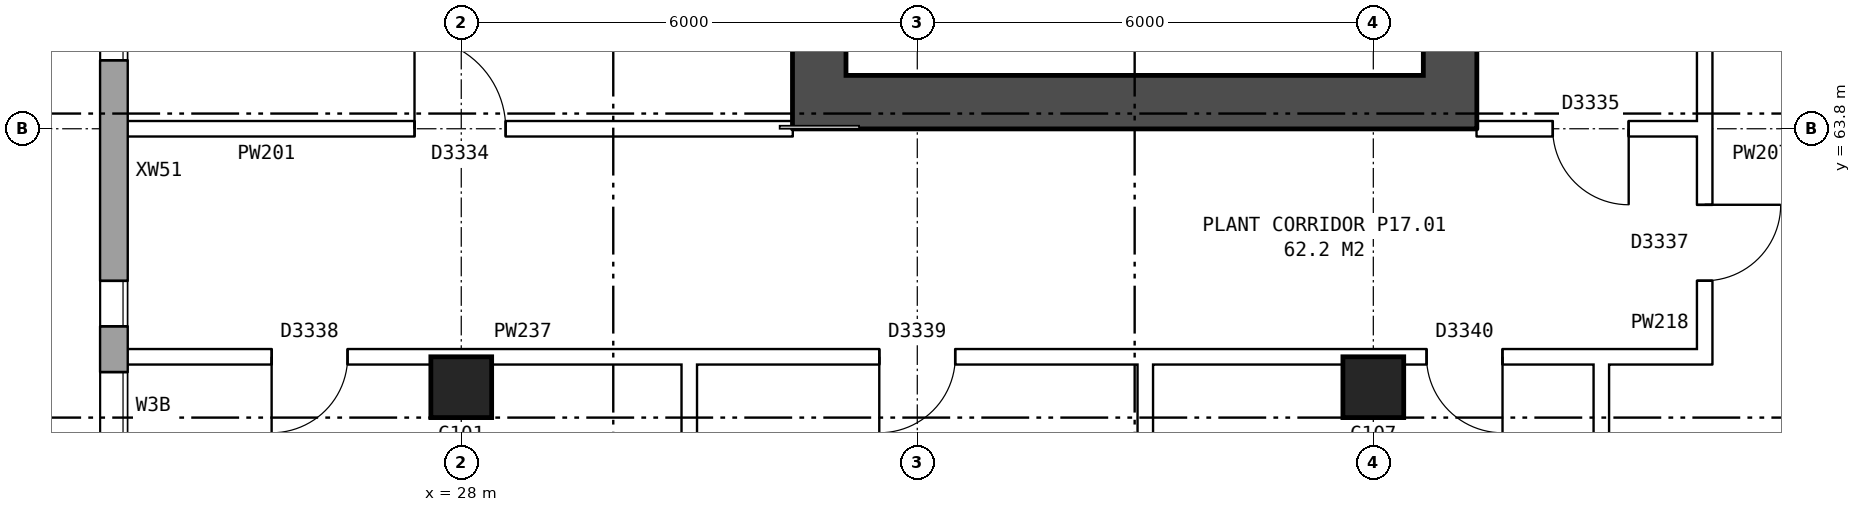
"""IFC4 building model, lengths in metres.
Left out: names, types, materials, properties, quantities, classifications, styles, units other than length and angle.
Written with IfcOpenShell. Run it as: python <this file> out.ifc"""

import sys

from ifc_helpers import new_model, si_unit, direction, frame, frame_2d, origin, origin_2d, place, context, subcontext, project, spatial, rectangle, extrude, element, fill, save


model = new_model("IFC4")
c1 = context("Model", 3, precision=1e-05, world=origin(), true_north=direction((0.0, 1.0)))
c2 = subcontext(c1, "Body", "Model", "MODEL_VIEW")
j1 = project(units=[si_unit("LENGTHUNIT", "METRE"), si_unit("PLANEANGLEUNIT", "RADIAN")], contexts=[c1])
p1 = place(None, origin())
s1 = spatial("IfcSite", under=j1, at=p1, CompositionType="ELEMENT")
p2 = place(p1, origin())
s2 = spatial("IfcBuilding", under=s1, at=p2, CompositionType="ELEMENT")
p3 = place(p2, frame((0.0, 0.0, 62.9)))
s3 = spatial("IfcBuildingStorey", under=s2, at=p3, CompositionType="ELEMENT", Elevation=62.9)
for number, where, z_axis, x_axis in (
    (1, (28.0, 60.4, 0.0), (0.0, 0.0, 1.0), (1.0, 0.0, 0.0)),
    (2, (40.0, 60.4, 0.0), (0.0, 0.0, 1.0), (1.0, 0.0, 0.0)),
):
    element("IfcColumn", number, at=place(p3, frame(where, z_axis=z_axis, x_axis=x_axis)), inside=s3, PredefinedType="COLUMN", context=c2, shape_type="SweptSolid", body=[
        extrude(rectangle(XDim=0.8, YDim=0.8, at=origin_2d()), origin(), (0.0, 0.0, 1.0), 4.2),
    ])
p4 = place(p3, frame((23.43, 82.925, 0.0), z_axis=(0.0, 0.0, 1.0), x_axis=(0.0, -1.0, 0.0)))
e3 = element("IfcWall", 3, at=p4, inside=s3, PredefinedType="STANDARD", context=c2, shape_type="SweptSolid", body=[
    extrude(rectangle(XDim=25.851, YDim=0.36, at=frame_2d((12.925, 0.0))), origin(), (0.0, 0.0, 1.0), 4.2),
])
p5 = place(p4, frame((1.625, 0.0, 1.5)))
e4 = element("IfcOpeningElement", 4, at=p5, cuts=e3, PredefinedType="OPENING", context=c2, shape_type="SweptSolid", body=[
    extrude(rectangle(XDim=1.6, YDim=1.2, at=frame_2d((0.8, 0.6))), frame((0.0, 0.19, 0.0), z_axis=(0.0, -1.0, 0.0), x_axis=(1.0, 0.0, 0.0)), (0.0, 0.0, 1.0), 0.38),
])
p6 = place(p4, frame((4.625, 0.0, 1.5)))
e5 = element("IfcOpeningElement", 5, at=p6, cuts=e3, PredefinedType="OPENING", context=c2, shape_type="SweptSolid", body=[
    extrude(rectangle(XDim=1.6, YDim=1.2, at=frame_2d((0.8, 0.6))), frame((0.0, 0.19, 0.0), z_axis=(0.0, -1.0, 0.0), x_axis=(1.0, 0.0, 0.0)), (0.0, 0.0, 1.0), 0.38),
])
p7 = place(p4, frame((8.775, 0.0, 1.5)))
e6 = element("IfcOpeningElement", 6, at=p7, cuts=e3, PredefinedType="OPENING", context=c2, shape_type="SweptSolid", body=[
    extrude(rectangle(XDim=0.6, YDim=1.2, at=frame_2d((0.3, 0.6))), frame((0.0, 0.19, 0.0), z_axis=(0.0, -1.0, 0.0), x_axis=(1.0, 0.0, 0.0)), (0.0, 0.0, 1.0), 0.38),
])
p8 = place(p4, frame((9.675, 0.0, 1.5)))
e7 = element("IfcOpeningElement", 7, at=p8, cuts=e3, PredefinedType="OPENING", context=c2, shape_type="SweptSolid", body=[
    extrude(rectangle(XDim=1.2, YDim=1.2, at=frame_2d((0.6, 0.6))), frame((0.0, 0.19, 0.0), z_axis=(0.0, -1.0, 0.0), x_axis=(1.0, 0.0, 0.0)), (0.0, 0.0, 1.0), 0.38),
])
p9 = place(p4, frame((13.625, 0.0, 1.5)))
e8 = element("IfcOpeningElement", 8, at=p9, cuts=e3, PredefinedType="OPENING", context=c2, shape_type="SweptSolid", body=[
    extrude(rectangle(XDim=1.6, YDim=1.2, at=frame_2d((0.8, 0.6))), frame((0.0, 0.19, 0.0), z_axis=(0.0, -1.0, 0.0), x_axis=(1.0, 0.0, 0.0)), (0.0, 0.0, 1.0), 0.38),
])
p10 = place(p4, frame((16.625, 0.0, 1.5)))
e9 = element("IfcOpeningElement", 9, at=p10, cuts=e3, PredefinedType="OPENING", context=c2, shape_type="SweptSolid", body=[
    extrude(rectangle(XDim=1.6, YDim=1.2, at=frame_2d((0.8, 0.6))), frame((0.0, 0.19, 0.0), z_axis=(0.0, -1.0, 0.0), x_axis=(1.0, 0.0, 0.0)), (0.0, 0.0, 1.0), 0.38),
])
p11 = place(p4, frame((21.125, 0.0, 1.5)))
e10 = element("IfcOpeningElement", 10, at=p11, cuts=e3, PredefinedType="OPENING", context=c2, shape_type="SweptSolid", body=[
    extrude(rectangle(XDim=0.6, YDim=1.2, at=frame_2d((0.3, 0.6))), frame((0.0, 0.19, 0.0), z_axis=(0.0, -1.0, 0.0), x_axis=(1.0, 0.0, 0.0)), (0.0, 0.0, 1.0), 0.38),
])
p12 = place(p4, frame((22.325, 0.0, 1.5)))
e11 = element("IfcOpeningElement", 11, at=p12, cuts=e3, PredefinedType="OPENING", context=c2, shape_type="SweptSolid", body=[
    extrude(rectangle(XDim=0.9, YDim=1.2, at=frame_2d((0.45, 0.6))), frame((0.0, 0.19, 0.0), z_axis=(0.0, -1.0, 0.0), x_axis=(1.0, 0.0, 0.0)), (0.0, 0.0, 1.0), 0.38),
])
p13 = place(p4, frame((15.525, 0.0, 1.5)))
e12 = element("IfcOpeningElement", 12, at=p13, cuts=e3, PredefinedType="OPENING", context=c2, shape_type="SweptSolid", body=[
    extrude(rectangle(XDim=0.6, YDim=1.2, at=frame_2d((0.3, 0.6))), frame((0.0, 0.19, 0.0), z_axis=(0.0, -1.0, 0.0), x_axis=(1.0, 0.0, 0.0)), (0.0, 0.0, 1.0), 0.38),
])
p14 = place(p3, frame((41.01, 75.5, 0.0), z_axis=(0.0, 0.0, 1.0), x_axis=(0.0, -1.0, 0.0)))
e13 = element("IfcWall", 13, at=p14, inside=s3, PredefinedType="SHEAR", context=c2, shape_type="SweptSolid", body=[
    extrude(rectangle(XDim=11.0, YDim=0.7, at=frame_2d((5.5, 0.0))), origin(), (0.0, 0.0, 1.0), 4.2),
])
p15 = place(p14, frame((0.625, 0.0, 0.0)))
e14 = element("IfcOpeningElement", 14, at=p15, cuts=e13, PredefinedType="OPENING", context=c2, shape_type="SweptSolid", body=[
    extrude(rectangle(XDim=1.1, YDim=2.1, at=frame_2d((0.55, 1.05))), frame((0.0, 0.36, 0.0), z_axis=(0.0, -1.0, 0.0), x_axis=(1.0, 0.0, 0.0)), (0.0, 0.0, 1.0), 0.72),
])
p16 = place(p14, frame((2.9, 0.0, 0.0)))
e15 = element("IfcOpeningElement", 15, at=p16, cuts=e13, PredefinedType="OPENING", context=c2, shape_type="SweptSolid", body=[
    extrude(rectangle(XDim=1.1, YDim=2.1, at=frame_2d((0.55, 1.05))), frame((0.0, 0.36, 0.0), z_axis=(0.0, -1.0, 0.0), x_axis=(1.0, 0.0, 0.0)), (0.0, 0.0, 1.0), 0.72),
])
p17 = place(p14, frame((5.1, 0.0, 0.0)))
e16 = element("IfcOpeningElement", 16, at=p17, cuts=e13, PredefinedType="OPENING", context=c2, shape_type="SweptSolid", body=[
    extrude(rectangle(XDim=1.1, YDim=2.1, at=frame_2d((0.55, 1.05))), frame((0.0, 0.36, 0.0), z_axis=(0.0, -1.0, 0.0), x_axis=(1.0, 0.0, 0.0)), (0.0, 0.0, 1.0), 0.72),
])
p18 = place(p14, frame((7.3, 0.0, 0.0)))
e17 = element("IfcOpeningElement", 17, at=p18, cuts=e13, PredefinedType="OPENING", context=c2, shape_type="SweptSolid", body=[
    extrude(rectangle(XDim=1.1, YDim=2.1, at=frame_2d((0.55, 1.05))), frame((0.0, 0.36, 0.0), z_axis=(0.0, -1.0, 0.0), x_axis=(1.0, 0.0, 0.0)), (0.0, 0.0, 1.0), 0.72),
])
p19 = place(p14, frame((9.2, 0.0, 0.0)))
e18 = element("IfcOpeningElement", 18, at=p19, cuts=e13, PredefinedType="OPENING", context=c2, shape_type="SweptSolid", body=[
    extrude(rectangle(XDim=1.1, YDim=2.1, at=frame_2d((0.55, 1.05))), frame((0.0, 0.36, 0.0), z_axis=(0.0, -1.0, 0.0), x_axis=(1.0, 0.0, 0.0)), (0.0, 0.0, 1.0), 0.72),
])
p20 = place(p3, frame((32.71, 75.5, 0.0), z_axis=(0.0, 0.0, 1.0), x_axis=(0.0, -1.0, 0.0)))
e19 = element("IfcWall", 19, at=p20, inside=s3, PredefinedType="SHEAR", context=c2, shape_type="SweptSolid", body=[
    extrude(rectangle(XDim=11.0, YDim=0.7, at=frame_2d((5.5, 0.0))), origin(), (0.0, 0.0, 1.0), 4.2),
])
p21 = place(p3, frame((41.36, 64.15, 0.0), z_axis=(0.0, 0.0, 1.0), x_axis=(-1.0, 0.0, 0.0)))
e20 = element("IfcWall", 20, at=p21, inside=s3, PredefinedType="SHEAR", context=c2, shape_type="SweptSolid", body=[
    extrude(rectangle(XDim=9.0, YDim=0.7, at=frame_2d((4.5, 0.0))), origin(), (0.0, 0.0, 1.0), 4.2),
])
p22 = place(p3, frame((44.36, 63.9, 0.0), z_axis=(0.0, 0.0, 1.0), x_axis=(0.0, 1.0, 0.0)))
e21 = element("IfcWall", 21, at=p22, inside=s3, PredefinedType="PARTITIONING", context=c2, shape_type="SweptSolid", body=[
    extrude(rectangle(XDim=12.2, YDim=0.2, at=frame_2d((6.1, 0.0))), origin(), (0.0, 0.0, 1.0), 4.2),
])
p23 = place(p22, frame((5.1, 0.0, 0.0)))
e22 = element("IfcOpeningElement", 22, at=p23, cuts=e21, PredefinedType="OPENING", context=c2, shape_type="SweptSolid", body=[
    extrude(rectangle(XDim=2.0, YDim=2.1, at=frame_2d((1.0, 1.05))), frame((0.0, 0.11, 0.0), z_axis=(0.0, -1.0, 0.0), x_axis=(1.0, 0.0, 0.0)), (0.0, 0.0, 1.0), 0.22),
])
p24 = place(p3, frame((23.49, 60.8, 0.0), z_axis=(0.0, 0.0, 1.0), x_axis=(1.0, 0.0, 0.0)))
e23 = element("IfcWall", 23, at=p24, inside=s3, PredefinedType="PARTITIONING", context=c2, shape_type="SweptSolid", body=[
    extrude(rectangle(XDim=20.97, YDim=0.2, at=frame_2d((10.485, 0.0))), origin(), (0.0, 0.0, 1.0), 4.2),
])
p25 = place(p24, frame((2.015, 0.0, 0.0)))
e24 = element("IfcOpeningElement", 24, at=p25, cuts=e23, PredefinedType="OPENING", context=c2, shape_type="SweptSolid", body=[
    extrude(rectangle(XDim=1.0, YDim=2.1, at=frame_2d((0.5, 1.05))), frame((0.0, 0.11, 0.0), z_axis=(0.0, -1.0, 0.0), x_axis=(1.0, 0.0, 0.0)), (0.0, 0.0, 1.0), 0.22),
])
p26 = place(p24, frame((10.01, 0.0, 0.0)))
e25 = element("IfcOpeningElement", 25, at=p26, cuts=e23, PredefinedType="OPENING", context=c2, shape_type="SweptSolid", body=[
    extrude(rectangle(XDim=1.0, YDim=2.1, at=frame_2d((0.5, 1.05))), frame((0.0, 0.11, 0.0), z_axis=(0.0, -1.0, 0.0), x_axis=(1.0, 0.0, 0.0)), (0.0, 0.0, 1.0), 0.22),
])
p27 = place(p24, frame((17.21, 0.0, 0.0)))
e26 = element("IfcOpeningElement", 26, at=p27, cuts=e23, PredefinedType="OPENING", context=c2, shape_type="SweptSolid", body=[
    extrude(rectangle(XDim=1.0, YDim=2.1, at=frame_2d((0.5, 1.05))), frame((0.0, 0.11, 0.0), z_axis=(0.0, -1.0, 0.0), x_axis=(1.0, 0.0, 0.0)), (0.0, 0.0, 1.0), 0.22),
])
p28 = place(p3, frame((23.49, 63.8, 0.0), z_axis=(0.0, 0.0, 1.0), x_axis=(1.0, 0.0, 0.0)))
e27 = element("IfcWall", 27, at=p28, inside=s3, PredefinedType="PARTITIONING", context=c2, shape_type="SweptSolid", body=[
    extrude(rectangle(XDim=8.87, YDim=0.2, at=frame_2d((4.435, 0.0))), origin(), (0.0, 0.0, 1.0), 4.2),
])
p29 = place(p28, frame((3.895, 0.0, 0.0)))
e28 = element("IfcOpeningElement", 28, at=p29, cuts=e27, PredefinedType="OPENING", context=c2, shape_type="SweptSolid", body=[
    extrude(rectangle(XDim=1.2, YDim=2.1, at=frame_2d((0.6, 1.05))), frame((0.0, 0.11, 0.0), z_axis=(0.0, -1.0, 0.0), x_axis=(1.0, 0.0, 0.0)), (0.0, 0.0, 1.0), 0.22),
])
p30 = place(p3, frame((41.36, 63.8, 0.0), z_axis=(0.0, 0.0, 1.0), x_axis=(1.0, 0.0, 0.0)))
e29 = element("IfcWall", 29, at=p30, inside=s3, PredefinedType="PARTITIONING", context=c2, shape_type="SweptSolid", body=[
    extrude(rectangle(XDim=3.1, YDim=0.2, at=frame_2d((1.55, 0.0))), origin(), (0.0, 0.0, 1.0), 4.2),
])
p31 = place(p30, frame((1.0, 0.0, 0.0)))
e30 = element("IfcOpeningElement", 30, at=p31, cuts=e29, PredefinedType="OPENING", context=c2, shape_type="SweptSolid", body=[
    extrude(rectangle(XDim=1.0, YDim=2.1, at=frame_2d((0.5, 1.05))), frame((0.0, 0.11, 0.0), z_axis=(0.0, -1.0, 0.0), x_axis=(1.0, 0.0, 0.0)), (0.0, 0.0, 1.0), 0.22),
])
for number, where, z_axis, x_axis in (
    (31, (31.0, 54.24, 0.0), (0.0, 0.0, 1.0), (0.0, 1.0, 0.0)),
    (32, (37.0, 54.24, 0.0), (0.0, 0.0, 1.0), (0.0, 1.0, 0.0)),
    (33, (43.0, 54.24, 0.0), (0.0, 0.0, 1.0), (0.0, 1.0, 0.0)),
):
    element("IfcWall", number, at=place(p3, frame(where, z_axis=z_axis, x_axis=x_axis)), inside=s3, PredefinedType="PARTITIONING", context=c2, shape_type="SweptSolid", body=[
        extrude(rectangle(XDim=6.66, YDim=0.2, at=frame_2d((3.33, 0.0))), origin(), (0.0, 0.0, 1.0), 4.2),
    ])
p32 = place(p3, frame((44.36, 60.7, 0.0), z_axis=(0.0, 0.0, 1.0), x_axis=(0.0, 1.0, 0.0)))
e34 = element("IfcWall", 34, at=p32, inside=s3, PredefinedType="PARTITIONING", context=c2, shape_type="SweptSolid", body=[
    extrude(rectangle(XDim=3.2, YDim=0.2, at=frame_2d((1.6, 0.0))), origin(), (0.0, 0.0, 1.0), 4.2),
])
p33 = place(p32, frame((1.1, 0.0, 0.0)))
e35 = element("IfcOpeningElement", 35, at=p33, cuts=e34, PredefinedType="OPENING", context=c2, shape_type="SweptSolid", body=[
    extrude(rectangle(XDim=1.0, YDim=2.1, at=frame_2d((0.5, 1.05))), frame((0.0, 0.11, 0.0), z_axis=(0.0, -1.0, 0.0), x_axis=(1.0, 0.0, 0.0)), (0.0, 0.0, 1.0), 0.22),
])
p34 = place(p10, origin())
e36 = element("IfcWindow", 36, at=p34, inside=s3, PartitioningType="DOUBLE_PANEL_HORIZONTAL", PredefinedType="WINDOW", context=c2, shape_type="SweptSolid", body=[
    extrude(rectangle(XDim=1.6, YDim=1.2, at=frame_2d((0.8, 0.6))), frame((0.0, 0.15, 0.0), z_axis=(0.0, -1.0, 0.0), x_axis=(1.0, 0.0, 0.0)), (0.0, 0.0, 1.0), 0.06),
])
fill(e9, e36)
p35 = place(p11, origin())
e37 = element("IfcWindow", 37, at=p35, inside=s3, PartitioningType="DOUBLE_PANEL_HORIZONTAL", PredefinedType="WINDOW", context=c2, shape_type="SweptSolid", body=[
    extrude(rectangle(XDim=0.6, YDim=1.2, at=frame_2d((0.3, 0.6))), frame((0.0, 0.15, 0.0), z_axis=(0.0, -1.0, 0.0), x_axis=(1.0, 0.0, 0.0)), (0.0, 0.0, 1.0), 0.06),
])
fill(e10, e37)
p36 = place(p12, origin())
e38 = element("IfcWindow", 38, at=p36, inside=s3, PartitioningType="DOUBLE_PANEL_HORIZONTAL", PredefinedType="WINDOW", context=c2, shape_type="SweptSolid", body=[
    extrude(rectangle(XDim=0.9, YDim=1.2, at=frame_2d((0.45, 0.6))), frame((0.0, 0.15, 0.0), z_axis=(0.0, -1.0, 0.0), x_axis=(1.0, 0.0, 0.0)), (0.0, 0.0, 1.0), 0.06),
])
fill(e11, e38)
p37 = place(p25, frame((1.0, 0.0, 0.0), z_axis=(0.0, 0.0, 1.0), x_axis=(-1.0, 0.0, 0.0)))
e39 = element("IfcDoor", 39, at=p37, inside=s3, OperationType="SINGLE_SWING_RIGHT", PredefinedType="DOOR", context=c2, shape_type="SweptSolid", body=[
    extrude(rectangle(XDim=1.0, YDim=2.1, at=frame_2d((0.5, 1.05))), frame((0.0, 0.025, 0.0), z_axis=(0.0, -1.0, 0.0), x_axis=(1.0, 0.0, 0.0)), (0.0, 0.0, 1.0), 0.05),
])
fill(e24, e39)
p38 = place(p26, frame((1.0, 0.0, 0.0), z_axis=(0.0, 0.0, 1.0), x_axis=(-1.0, 0.0, 0.0)))
e40 = element("IfcDoor", 40, at=p38, inside=s3, OperationType="SINGLE_SWING_RIGHT", PredefinedType="DOOR", context=c2, shape_type="SweptSolid", body=[
    extrude(rectangle(XDim=1.0, YDim=2.1, at=frame_2d((0.5, 1.05))), frame((0.0, 0.025, 0.0), z_axis=(0.0, -1.0, 0.0), x_axis=(1.0, 0.0, 0.0)), (0.0, 0.0, 1.0), 0.05),
])
fill(e25, e40)
p39 = place(p27, frame((1.0, 0.0, 0.0), z_axis=(0.0, 0.0, 1.0), x_axis=(-1.0, 0.0, 0.0)))
e41 = element("IfcDoor", 41, at=p39, inside=s3, OperationType="SINGLE_SWING_LEFT", PredefinedType="DOOR", context=c2, shape_type="SweptSolid", body=[
    extrude(rectangle(XDim=1.0, YDim=2.1, at=frame_2d((0.5, 1.05))), frame((0.0, 0.025, 0.0), z_axis=(0.0, -1.0, 0.0), x_axis=(1.0, 0.0, 0.0)), (0.0, 0.0, 1.0), 0.05),
])
fill(e26, e41)
p40 = place(p29, origin())
e42 = element("IfcDoor", 42, at=p40, inside=s3, OperationType="SINGLE_SWING_LEFT", PredefinedType="DOOR", context=c2, shape_type="SweptSolid", body=[
    extrude(rectangle(XDim=1.2, YDim=2.1, at=frame_2d((0.6, 1.05))), frame((0.0, 0.025, 0.0), z_axis=(0.0, -1.0, 0.0), x_axis=(1.0, 0.0, 0.0)), (0.0, 0.0, 1.0), 0.05),
])
fill(e28, e42)
p41 = place(p31, frame((1.0, 0.0, 0.0), z_axis=(0.0, 0.0, 1.0), x_axis=(-1.0, 0.0, 0.0)))
e43 = element("IfcDoor", 43, at=p41, inside=s3, OperationType="SINGLE_SWING_LEFT", PredefinedType="DOOR", context=c2, shape_type="SweptSolid", body=[
    extrude(rectangle(XDim=1.0, YDim=2.1, at=frame_2d((0.5, 1.05))), frame((0.0, 0.025, 0.0), z_axis=(0.0, -1.0, 0.0), x_axis=(1.0, 0.0, 0.0)), (0.0, 0.0, 1.0), 0.05),
])
fill(e30, e43)
p42 = place(p33, frame((1.0, 0.0, 0.0), z_axis=(0.0, 0.0, 1.0), x_axis=(-1.0, 0.0, 0.0)))
e44 = element("IfcDoor", 44, at=p42, inside=s3, OperationType="SINGLE_SWING_LEFT", PredefinedType="DOOR", context=c2, shape_type="SweptSolid", body=[
    extrude(rectangle(XDim=1.0, YDim=2.1, at=frame_2d((0.5, 1.05))), frame((0.0, 0.025, 0.0), z_axis=(0.0, -1.0, 0.0), x_axis=(1.0, 0.0, 0.0)), (0.0, 0.0, 1.0), 0.05),
])
fill(e35, e44)
save(model, sys.argv[1])
